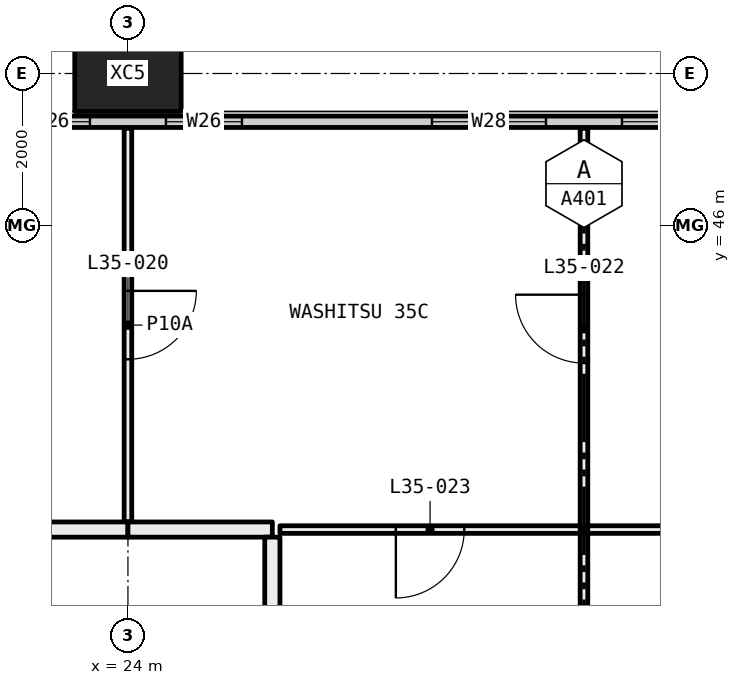
"""IFC4 building model, lengths in metres.
Left out: names, types, materials, properties, quantities, classifications, styles, units other than length and angle.
Written with IfcOpenShell. Run it as: python <this file> out.ifc"""

import sys

from ifc_helpers import new_model, si_unit, direction, frame, frame_2d, origin, origin_2d, place, context, subcontext, project, spatial, rectangle, hollow_rectangle, extrude, element, fill, save


model = new_model("IFC4")
c1 = context("Model", 3, precision=1e-05, world=origin(), true_north=direction((0.0, 1.0)))
c2 = subcontext(c1, "Body", "Model", "MODEL_VIEW")
j1 = project(units=[si_unit("LENGTHUNIT", "METRE"), si_unit("PLANEANGLEUNIT", "RADIAN")], contexts=[c1])
p1 = place(None, origin())
s1 = spatial("IfcSite", under=j1, at=p1, CompositionType="ELEMENT")
p2 = place(p1, origin())
s2 = spatial("IfcBuilding", under=s1, at=p2, CompositionType="ELEMENT")
p3 = place(p2, frame((0.0, 0.0, 134.55)))
s3 = spatial("IfcBuildingStorey", under=s2, at=p3, CompositionType="ELEMENT", Elevation=134.55)
p4 = place(p3, frame((24.0, 48.0, -0.4), z_axis=(0.0, 0.0, 1.0), x_axis=(1.0, 0.0, 0.0)))
e1 = element("IfcColumn", 1, at=p4, inside=s3, PredefinedType="COLUMN", context=c2, shape_type="SweptSolid", body=[
    extrude(hollow_rectangle(XDim=1.4, YDim=1.0, WallThickness=0.055, at=origin_2d()), origin(), (0.0, 0.0, 1.0), 3.45),
])
p5 = place(p3, frame((6.56, 47.365, 0.0), z_axis=(0.0, 0.0, 1.0), x_axis=(1.0, 0.0, 0.0)))
e2 = element("IfcWall", 2, at=p5, inside=s3, PredefinedType="ELEMENTEDWALL", context=c2, shape_type="SweptSolid", body=[
    extrude(rectangle(XDim=58.88, YDim=0.15, at=frame_2d((29.44, 0.0))), origin(), (0.0, 0.0, 1.0), 3.05),
])
p6 = place(p5, frame((0.44, 0.0, 0.45)))
e3 = element("IfcOpeningElement", 3, at=p6, cuts=e2, PredefinedType="OPENING", context=c2, shape_type="SweptSolid", body=[
    extrude(rectangle(XDim=4.5, YDim=2.55, at=frame_2d((2.25, 1.275))), frame((0.0, 0.085, 0.0), z_axis=(0.0, -1.0, 0.0), x_axis=(1.0, 0.0, 0.0)), (0.0, 0.0, 1.0), 0.17),
])
p7 = place(p5, frame((5.94, 0.0, 0.45)))
e4 = element("IfcOpeningElement", 4, at=p7, cuts=e2, PredefinedType="OPENING", context=c2, shape_type="SweptSolid", body=[
    extrude(rectangle(XDim=1.0, YDim=2.55, at=frame_2d((0.5, 1.275))), frame((0.0, 0.085, 0.0), z_axis=(0.0, -1.0, 0.0), x_axis=(1.0, 0.0, 0.0)), (0.0, 0.0, 1.0), 0.17),
])
p8 = place(p5, frame((9.44, 0.0, 0.45)))
e5 = element("IfcOpeningElement", 5, at=p8, cuts=e2, PredefinedType="OPENING", context=c2, shape_type="SweptSolid", body=[
    extrude(rectangle(XDim=1.5, YDim=2.55, at=frame_2d((0.75, 1.275))), frame((0.0, 0.085, 0.0), z_axis=(0.0, -1.0, 0.0), x_axis=(1.0, 0.0, 0.0)), (0.0, 0.0, 1.0), 0.17),
])
p9 = place(p5, frame((11.94, 0.0, 0.45)))
e6 = element("IfcOpeningElement", 6, at=p9, cuts=e2, PredefinedType="OPENING", context=c2, shape_type="SweptSolid", body=[
    extrude(rectangle(XDim=1.5, YDim=2.55, at=frame_2d((0.75, 1.275))), frame((0.0, 0.085, 0.0), z_axis=(0.0, -1.0, 0.0), x_axis=(1.0, 0.0, 0.0)), (0.0, 0.0, 1.0), 0.17),
])
p10 = place(p5, frame((15.94, 0.0, 0.45)))
e7 = element("IfcOpeningElement", 7, at=p10, cuts=e2, PredefinedType="OPENING", context=c2, shape_type="SweptSolid", body=[
    extrude(rectangle(XDim=1.0, YDim=2.55, at=frame_2d((0.5, 1.275))), frame((0.0, 0.085, 0.0), z_axis=(0.0, -1.0, 0.0), x_axis=(1.0, 0.0, 0.0)), (0.0, 0.0, 1.0), 0.17),
])
p11 = place(p5, frame((17.94, 0.0, 0.45)))
e8 = element("IfcOpeningElement", 8, at=p11, cuts=e2, PredefinedType="OPENING", context=c2, shape_type="SweptSolid", body=[
    extrude(rectangle(XDim=1.0, YDim=2.55, at=frame_2d((0.5, 1.275))), frame((0.0, 0.085, 0.0), z_axis=(0.0, -1.0, 0.0), x_axis=(1.0, 0.0, 0.0)), (0.0, 0.0, 1.0), 0.17),
])
p12 = place(p5, frame((21.44, 0.0, 0.45)))
e9 = element("IfcOpeningElement", 9, at=p12, cuts=e2, PredefinedType="OPENING", context=c2, shape_type="SweptSolid", body=[
    extrude(rectangle(XDim=1.5, YDim=2.55, at=frame_2d((0.75, 1.275))), frame((0.0, 0.085, 0.0), z_axis=(0.0, -1.0, 0.0), x_axis=(1.0, 0.0, 0.0)), (0.0, 0.0, 1.0), 0.17),
])
p13 = place(p5, frame((23.94, 0.0, 0.45)))
e10 = element("IfcOpeningElement", 10, at=p13, cuts=e2, PredefinedType="OPENING", context=c2, shape_type="SweptSolid", body=[
    extrude(rectangle(XDim=1.5, YDim=2.55, at=frame_2d((0.75, 1.275))), frame((0.0, 0.085, 0.0), z_axis=(0.0, -1.0, 0.0), x_axis=(1.0, 0.0, 0.0)), (0.0, 0.0, 1.0), 0.17),
])
p14 = place(p5, frame((27.94, 0.0, 0.45)))
e11 = element("IfcOpeningElement", 11, at=p14, cuts=e2, PredefinedType="OPENING", context=c2, shape_type="SweptSolid", body=[
    extrude(rectangle(XDim=1.0, YDim=2.55, at=frame_2d((0.5, 1.275))), frame((0.0, 0.085, 0.0), z_axis=(0.0, -1.0, 0.0), x_axis=(1.0, 0.0, 0.0)), (0.0, 0.0, 1.0), 0.17),
])
p15 = place(p5, frame((29.94, 0.0, 0.45)))
e12 = element("IfcOpeningElement", 12, at=p15, cuts=e2, PredefinedType="OPENING", context=c2, shape_type="SweptSolid", body=[
    extrude(rectangle(XDim=1.0, YDim=2.55, at=frame_2d((0.5, 1.275))), frame((0.0, 0.085, 0.0), z_axis=(0.0, -1.0, 0.0), x_axis=(1.0, 0.0, 0.0)), (0.0, 0.0, 1.0), 0.17),
])
p16 = place(p5, frame((33.44, 0.0, 0.45)))
e13 = element("IfcOpeningElement", 13, at=p16, cuts=e2, PredefinedType="OPENING", context=c2, shape_type="SweptSolid", body=[
    extrude(rectangle(XDim=1.5, YDim=2.55, at=frame_2d((0.75, 1.275))), frame((0.0, 0.085, 0.0), z_axis=(0.0, -1.0, 0.0), x_axis=(1.0, 0.0, 0.0)), (0.0, 0.0, 1.0), 0.17),
])
p17 = place(p5, frame((35.94, 0.0, 0.45)))
e14 = element("IfcOpeningElement", 14, at=p17, cuts=e2, PredefinedType="OPENING", context=c2, shape_type="SweptSolid", body=[
    extrude(rectangle(XDim=1.5, YDim=2.55, at=frame_2d((0.75, 1.275))), frame((0.0, 0.085, 0.0), z_axis=(0.0, -1.0, 0.0), x_axis=(1.0, 0.0, 0.0)), (0.0, 0.0, 1.0), 0.17),
])
p18 = place(p5, frame((39.94, 0.0, 0.45)))
e15 = element("IfcOpeningElement", 15, at=p18, cuts=e2, PredefinedType="OPENING", context=c2, shape_type="SweptSolid", body=[
    extrude(rectangle(XDim=1.0, YDim=2.55, at=frame_2d((0.5, 1.275))), frame((0.0, 0.085, 0.0), z_axis=(0.0, -1.0, 0.0), x_axis=(1.0, 0.0, 0.0)), (0.0, 0.0, 1.0), 0.17),
])
p19 = place(p5, frame((41.94, 0.0, 0.45)))
e16 = element("IfcOpeningElement", 16, at=p19, cuts=e2, PredefinedType="OPENING", context=c2, shape_type="SweptSolid", body=[
    extrude(rectangle(XDim=1.0, YDim=2.55, at=frame_2d((0.5, 1.275))), frame((0.0, 0.085, 0.0), z_axis=(0.0, -1.0, 0.0), x_axis=(1.0, 0.0, 0.0)), (0.0, 0.0, 1.0), 0.17),
])
p20 = place(p5, frame((45.44, 0.0, 0.45)))
e17 = element("IfcOpeningElement", 17, at=p20, cuts=e2, PredefinedType="OPENING", context=c2, shape_type="SweptSolid", body=[
    extrude(rectangle(XDim=1.5, YDim=2.55, at=frame_2d((0.75, 1.275))), frame((0.0, 0.085, 0.0), z_axis=(0.0, -1.0, 0.0), x_axis=(1.0, 0.0, 0.0)), (0.0, 0.0, 1.0), 0.17),
])
p21 = place(p5, frame((47.94, 0.0, 0.45)))
e18 = element("IfcOpeningElement", 18, at=p21, cuts=e2, PredefinedType="OPENING", context=c2, shape_type="SweptSolid", body=[
    extrude(rectangle(XDim=1.5, YDim=2.55, at=frame_2d((0.75, 1.275))), frame((0.0, 0.085, 0.0), z_axis=(0.0, -1.0, 0.0), x_axis=(1.0, 0.0, 0.0)), (0.0, 0.0, 1.0), 0.17),
])
p22 = place(p5, frame((51.94, 0.0, 0.45)))
e19 = element("IfcOpeningElement", 19, at=p22, cuts=e2, PredefinedType="OPENING", context=c2, shape_type="SweptSolid", body=[
    extrude(rectangle(XDim=1.0, YDim=2.55, at=frame_2d((0.5, 1.275))), frame((0.0, 0.085, 0.0), z_axis=(0.0, -1.0, 0.0), x_axis=(1.0, 0.0, 0.0)), (0.0, 0.0, 1.0), 0.17),
])
p23 = place(p5, frame((53.94, 0.0, 0.45)))
e20 = element("IfcOpeningElement", 20, at=p23, cuts=e2, PredefinedType="OPENING", context=c2, shape_type="SweptSolid", body=[
    extrude(rectangle(XDim=4.5, YDim=2.55, at=frame_2d((2.25, 1.275))), frame((0.0, 0.085, 0.0), z_axis=(0.0, -1.0, 0.0), x_axis=(1.0, 0.0, 0.0)), (0.0, 0.0, 1.0), 0.17),
])
p24 = place(p3, frame((24.0, 42.1, 0.0), z_axis=(0.0, 0.0, 1.0), x_axis=(0.0, 1.0, 0.0)))
e21 = element("IfcWall", 21, at=p24, inside=s3, PredefinedType="PARTITIONING", context=c2, shape_type="SweptSolid", body=[
    extrude(rectangle(XDim=5.18, YDim=0.1, at=frame_2d((2.59, 0.0))), origin(), (0.0, 0.0, 1.0), 3.05),
])
p25 = place(p24, frame((2.14, 0.0, 0.0)))
e22 = element("IfcOpeningElement", 22, at=p25, cuts=e21, PredefinedType="OPENING", context=c2, shape_type="SweptSolid", body=[
    extrude(rectangle(XDim=0.9, YDim=2.1, at=frame_2d((0.45, 1.05))), frame((0.0, 0.06, 0.0), z_axis=(0.0, -1.0, 0.0), x_axis=(1.0, 0.0, 0.0)), (0.0, 0.0, 1.0), 0.12),
])
p26 = place(p3, frame((18.0, 42.0, 0.0), z_axis=(0.0, 0.0, 1.0), x_axis=(1.0, 0.0, 0.0)))
e23 = element("IfcWall", 23, at=p26, inside=s3, PredefinedType="PARTITIONING", context=c2, shape_type="SweptSolid", body=[
    extrude(rectangle(XDim=6.0, YDim=0.2, at=frame_2d((3.0, 0.0))), origin(), (0.0, 0.0, 1.0), 3.05),
])
p27 = place(p26, frame((2.5, 0.0, 0.0)))
e24 = element("IfcOpeningElement", 24, at=p27, cuts=e23, PredefinedType="OPENING", context=c2, shape_type="SweptSolid", body=[
    extrude(rectangle(XDim=1.0, YDim=2.1, at=frame_2d((0.5, 1.05))), frame((0.0, 0.11, 0.0), z_axis=(0.0, -1.0, 0.0), x_axis=(1.0, 0.0, 0.0)), (0.0, 0.0, 1.0), 0.22),
])
p28 = place(p3, frame((30.0, 42.0, 0.0), z_axis=(0.0, 0.0, 1.0), x_axis=(0.0, 1.0, 0.0)))
e25 = element("IfcWall", 25, at=p28, inside=s3, PredefinedType="PARTITIONING", context=c2, shape_type="SweptSolid", body=[
    extrude(rectangle(XDim=5.28, YDim=0.1, at=frame_2d((2.64, 0.0))), origin(), (0.0, 0.0, 1.0), 3.05),
])
p29 = place(p28, frame((2.19, 0.0, 0.0)))
e26 = element("IfcOpeningElement", 26, at=p29, cuts=e25, PredefinedType="OPENING", context=c2, shape_type="SweptSolid", body=[
    extrude(rectangle(XDim=0.9, YDim=2.1, at=frame_2d((0.45, 1.05))), frame((0.0, 0.06, 0.0), z_axis=(0.0, -1.0, 0.0), x_axis=(1.0, 0.0, 0.0)), (0.0, 0.0, 1.0), 0.12),
])
p30 = place(p3, frame((26.0, 42.0, 0.0), z_axis=(0.0, 0.0, 1.0), x_axis=(1.0, 0.0, 0.0)))
e27 = element("IfcWall", 27, at=p30, inside=s3, PredefinedType="PARTITIONING", context=c2, shape_type="SweptSolid", body=[
    extrude(rectangle(XDim=3.95, YDim=0.1, at=frame_2d((1.975, 0.0))), origin(), (0.0, 0.0, 1.0), 3.05),
])
p31 = place(p30, frame((1.525, 0.0, 0.0)))
e28 = element("IfcOpeningElement", 28, at=p31, cuts=e27, PredefinedType="OPENING", context=c2, shape_type="SweptSolid", body=[
    extrude(rectangle(XDim=0.9, YDim=2.1, at=frame_2d((0.45, 1.05))), frame((0.0, 0.06, 0.0), z_axis=(0.0, -1.0, 0.0), x_axis=(1.0, 0.0, 0.0)), (0.0, 0.0, 1.0), 0.12),
])
p32 = place(p3, frame((24.0, 42.0, 0.0), z_axis=(0.0, 0.0, 1.0), x_axis=(1.0, 0.0, 0.0)))
e29 = element("IfcWall", 29, at=p32, inside=s3, PredefinedType="PARTITIONING", context=c2, shape_type="SweptSolid", body=[
    extrude(rectangle(XDim=1.9, YDim=0.2, at=frame_2d((0.95, 0.0))), origin(), (0.0, 0.0, 1.0), 3.05),
])
p33 = place(p3, frame((30.05, 42.0, 0.0), z_axis=(0.0, 0.0, 1.0), x_axis=(1.0, 0.0, 0.0)))
e30 = element("IfcWall", 30, at=p33, inside=s3, PredefinedType="PARTITIONING", context=c2, shape_type="SweptSolid", body=[
    extrude(rectangle(XDim=4.45, YDim=0.1, at=frame_2d((2.225, 0.0))), origin(), (0.0, 0.0, 1.0), 3.05),
])
p34 = place(p3, frame((30.0, 36.1, 0.0), z_axis=(0.0, 0.0, 1.0), x_axis=(0.0, 1.0, 0.0)))
e31 = element("IfcWall", 31, at=p34, inside=s3, PredefinedType="PARTITIONING", context=c2, shape_type="SweptSolid", body=[
    extrude(rectangle(XDim=5.85, YDim=0.1, at=frame_2d((2.925, 0.0))), origin(), (0.0, 0.0, 1.0), 3.05),
])
p35 = place(p34, frame((2.475, 0.0, 0.0)))
e32 = element("IfcOpeningElement", 32, at=p35, cuts=e31, PredefinedType="OPENING", context=c2, shape_type="SweptSolid", body=[
    extrude(rectangle(XDim=0.9, YDim=2.1, at=frame_2d((0.45, 1.05))), frame((0.0, 0.06, 0.0), z_axis=(0.0, -1.0, 0.0), x_axis=(1.0, 0.0, 0.0)), (0.0, 0.0, 1.0), 0.12),
])
p36 = place(p3, frame((25.9, 41.9, 0.0), z_axis=(0.0, 0.0, 1.0), x_axis=(0.0, -1.0, 0.0)))
e33 = element("IfcWall", 33, at=p36, inside=s3, PredefinedType="PARTITIONING", context=c2, shape_type="SweptSolid", body=[
    extrude(rectangle(XDim=6.2, YDim=0.2, at=frame_2d((3.1, 0.0))), origin(), (0.0, 0.0, 1.0), 2.45),
])
p37 = place(p10, origin())
e34 = element("IfcWindow", 34, at=p37, inside=s3, PartitioningType="SINGLE_PANEL", PredefinedType="WINDOW", context=c2, shape_type="SweptSolid", body=[
    extrude(rectangle(XDim=1.0, YDim=2.55, at=frame_2d((0.5, 1.275))), frame((0.0, 0.03, 0.0), z_axis=(0.0, -1.0, 0.0), x_axis=(1.0, 0.0, 0.0)), (0.0, 0.0, 1.0), 0.06),
])
fill(e7, e34)
p38 = place(p11, origin())
e35 = element("IfcWindow", 35, at=p38, inside=s3, PartitioningType="SINGLE_PANEL", PredefinedType="WINDOW", context=c2, shape_type="SweptSolid", body=[
    extrude(rectangle(XDim=1.0, YDim=2.55, at=frame_2d((0.5, 1.275))), frame((0.0, 0.03, 0.0), z_axis=(0.0, -1.0, 0.0), x_axis=(1.0, 0.0, 0.0)), (0.0, 0.0, 1.0), 0.06),
])
fill(e8, e35)
p39 = place(p12, origin())
e36 = element("IfcWindow", 36, at=p39, inside=s3, PartitioningType="SINGLE_PANEL", PredefinedType="WINDOW", context=c2, shape_type="SweptSolid", body=[
    extrude(rectangle(XDim=1.5, YDim=2.55, at=frame_2d((0.75, 1.275))), frame((0.0, 0.03, 0.0), z_axis=(0.0, -1.0, 0.0), x_axis=(1.0, 0.0, 0.0)), (0.0, 0.0, 1.0), 0.06),
])
fill(e9, e36)
p40 = place(p13, origin())
e37 = element("IfcWindow", 37, at=p40, inside=s3, PartitioningType="SINGLE_PANEL", PredefinedType="WINDOW", context=c2, shape_type="SweptSolid", body=[
    extrude(rectangle(XDim=1.5, YDim=2.55, at=frame_2d((0.75, 1.275))), frame((0.0, 0.03, 0.0), z_axis=(0.0, -1.0, 0.0), x_axis=(1.0, 0.0, 0.0)), (0.0, 0.0, 1.0), 0.06),
])
fill(e10, e37)
p41 = place(p25, frame((0.9, 0.0, 0.0), x_axis=(-1.0, 0.0, 0.0)))
e38 = element("IfcDoor", 38, at=p41, inside=s3, OperationType="SINGLE_SWING_RIGHT", PredefinedType="DOOR", context=c2, shape_type="SweptSolid", body=[
    extrude(rectangle(XDim=0.9, YDim=2.1, at=frame_2d((0.45, 1.05))), frame((0.0, 0.025, 0.0), z_axis=(0.0, -1.0, 0.0), x_axis=(1.0, 0.0, 0.0)), (0.0, 0.0, 1.0), 0.05),
])
fill(e22, e38)
p42 = place(p29, origin())
e39 = element("IfcDoor", 39, at=p42, inside=s3, OperationType="SINGLE_SWING_LEFT", PredefinedType="DOOR", context=c2, shape_type="SweptSolid", body=[
    extrude(rectangle(XDim=0.9, YDim=2.1, at=frame_2d((0.45, 1.05))), frame((0.0, 0.025, 0.0), z_axis=(0.0, -1.0, 0.0), x_axis=(1.0, 0.0, 0.0)), (0.0, 0.0, 1.0), 0.05),
])
fill(e26, e39)
p43 = place(p31, frame((0.9, 0.0, 0.0), x_axis=(-1.0, 0.0, 0.0)))
e40 = element("IfcDoor", 40, at=p43, inside=s3, OperationType="SINGLE_SWING_LEFT", PredefinedType="DOOR", context=c2, shape_type="SweptSolid", body=[
    extrude(rectangle(XDim=0.9, YDim=2.1, at=frame_2d((0.45, 1.05))), frame((0.0, 0.025, 0.0), z_axis=(0.0, -1.0, 0.0), x_axis=(1.0, 0.0, 0.0)), (0.0, 0.0, 1.0), 0.05),
])
fill(e28, e40)
save(model, sys.argv[1])
